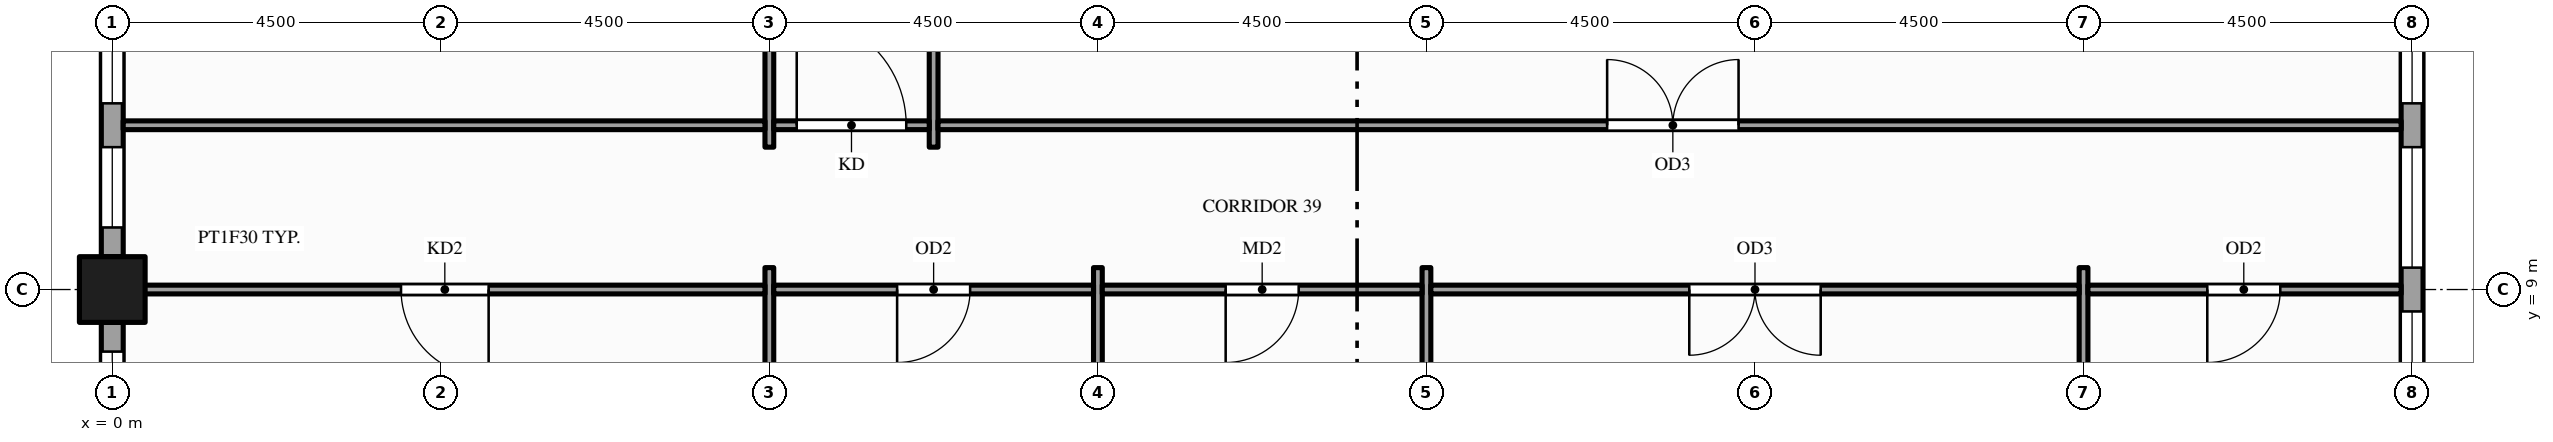
"""IFC4 building model, lengths in metres.
Left out: names, types, materials, properties, quantities, classifications, styles, units other than length and angle.
Written with IfcOpenShell. Run it as: python <this file> out.ifc"""

import sys

from ifc_helpers import new_model, si_unit, direction, frame, frame_2d, origin, origin_2d, place, context, subcontext, project, spatial, rectangle, hollow_rectangle, extrude, element, fill, save


model = new_model("IFC4")
c1 = context("Model", 3, precision=1e-05, world=origin(), true_north=direction((0.0, 1.0)))
c2 = subcontext(c1, "Body", "Model", "MODEL_VIEW")
j1 = project(units=[si_unit("LENGTHUNIT", "METRE"), si_unit("PLANEANGLEUNIT", "RADIAN")], contexts=[c1])
p1 = place(None, origin())
s1 = spatial("IfcSite", under=j1, at=p1, CompositionType="ELEMENT")
p2 = place(p1, origin())
s2 = spatial("IfcBuilding", under=s1, at=p2, CompositionType="ELEMENT")
p3 = place(p2, frame((0.0, 0.0, 143.0)))
s3 = spatial("IfcBuildingStorey", under=s2, at=p3, CompositionType="ELEMENT", Elevation=143.0)
p4 = place(p3, frame((0.0, 9.0, -0.15), z_axis=(0.0, 0.0, 1.0), x_axis=(1.0, 0.0, 0.0)))
e1 = element("IfcColumn", 1, at=p4, inside=s3, PredefinedType="COLUMN", context=c2, shape_type="SweptSolid", body=[
    extrude(hollow_rectangle(XDim=0.9, YDim=0.9, WallThickness=0.045, at=origin_2d()), origin(), (0.0, 0.0, 1.0), 4.0),
])
p5 = place(p3, frame((0.0, 13.05, 0.0), z_axis=(0.0, 0.0, 1.0), x_axis=(0.0, -1.0, 0.0)))
e2 = element("IfcWall", 2, at=p5, inside=s3, PredefinedType="STANDARD", context=c2, shape_type="SweptSolid", body=[
    extrude(rectangle(XDim=3.6, YDim=0.3, at=frame_2d((1.8, 0.0))), origin(), (0.0, 0.0, 1.0), 3.149),
])
p6 = place(p5, frame((0.4, 0.0, 0.9)))
e3 = element("IfcOpeningElement", 3, at=p6, cuts=e2, PredefinedType="OPENING", context=c2, shape_type="SweptSolid", body=[
    extrude(rectangle(XDim=1.1, YDim=2.0, at=frame_2d((0.55, 1.0))), frame((0.0, 0.16, 0.0), z_axis=(0.0, -1.0, 0.0), x_axis=(1.0, 0.0, 0.0)), (0.0, 0.0, 1.0), 0.32),
])
p7 = place(p5, frame((2.1, 0.0, 0.9)))
e4 = element("IfcOpeningElement", 4, at=p7, cuts=e2, PredefinedType="OPENING", context=c2, shape_type="SweptSolid", body=[
    extrude(rectangle(XDim=1.1, YDim=2.0, at=frame_2d((0.55, 1.0))), frame((0.0, 0.16, 0.0), z_axis=(0.0, -1.0, 0.0), x_axis=(1.0, 0.0, 0.0)), (0.0, 0.0, 1.0), 0.32),
])
p8 = place(p3, frame((0.0, 8.55, 0.0), z_axis=(0.0, 0.0, 1.0), x_axis=(0.0, -1.0, 0.0)))
e5 = element("IfcWall", 5, at=p8, inside=s3, PredefinedType="STANDARD", context=c2, shape_type="SweptSolid", body=[
    extrude(rectangle(XDim=3.6, YDim=0.3, at=frame_2d((1.8, 0.0))), origin(), (0.0, 0.0, 1.0), 3.149),
])
p9 = place(p8, frame((0.4, 0.0, 0.9)))
e6 = element("IfcOpeningElement", 6, at=p9, cuts=e5, PredefinedType="OPENING", context=c2, shape_type="SweptSolid", body=[
    extrude(rectangle(XDim=1.1, YDim=2.0, at=frame_2d((0.55, 1.0))), frame((0.0, 0.16, 0.0), z_axis=(0.0, -1.0, 0.0), x_axis=(1.0, 0.0, 0.0)), (0.0, 0.0, 1.0), 0.32),
])
p10 = place(p8, frame((2.1, 0.0, 0.9)))
e7 = element("IfcOpeningElement", 7, at=p10, cuts=e5, PredefinedType="OPENING", context=c2, shape_type="SweptSolid", body=[
    extrude(rectangle(XDim=1.1, YDim=2.0, at=frame_2d((0.55, 1.0))), frame((0.0, 0.16, 0.0), z_axis=(0.0, -1.0, 0.0), x_axis=(1.0, 0.0, 0.0)), (0.0, 0.0, 1.0), 0.32),
])
p11 = place(p3, frame((31.5, 1.95, 0.0), z_axis=(0.0, 0.0, 1.0), x_axis=(0.0, 1.0, 0.0)))
e8 = element("IfcWall", 8, at=p11, inside=s3, PredefinedType="STANDARD", context=c2, shape_type="SweptSolid", body=[
    extrude(rectangle(XDim=21.6, YDim=0.3, at=frame_2d((10.8, 0.0))), origin(), (0.0, 0.0, 1.0), 3.149),
])
p12 = place(p11, frame((0.6, 0.0, 0.9)))
e9 = element("IfcOpeningElement", 9, at=p12, cuts=e8, PredefinedType="OPENING", context=c2, shape_type="SweptSolid", body=[
    extrude(rectangle(XDim=1.65, YDim=2.0, at=frame_2d((0.825, 1.0))), frame((0.0, 0.16, 0.0), z_axis=(0.0, -1.0, 0.0), x_axis=(1.0, 0.0, 0.0)), (0.0, 0.0, 1.0), 0.32),
])
p13 = place(p11, frame((2.85, 0.0, 0.9)))
e10 = element("IfcOpeningElement", 10, at=p13, cuts=e8, PredefinedType="OPENING", context=c2, shape_type="SweptSolid", body=[
    extrude(rectangle(XDim=1.65, YDim=2.0, at=frame_2d((0.825, 1.0))), frame((0.0, 0.16, 0.0), z_axis=(0.0, -1.0, 0.0), x_axis=(1.0, 0.0, 0.0)), (0.0, 0.0, 1.0), 0.32),
])
p14 = place(p11, frame((5.1, 0.0, 0.9)))
e11 = element("IfcOpeningElement", 11, at=p14, cuts=e8, PredefinedType="OPENING", context=c2, shape_type="SweptSolid", body=[
    extrude(rectangle(XDim=1.65, YDim=2.0, at=frame_2d((0.825, 1.0))), frame((0.0, 0.16, 0.0), z_axis=(0.0, -1.0, 0.0), x_axis=(1.0, 0.0, 0.0)), (0.0, 0.0, 1.0), 0.32),
])
p15 = place(p11, frame((7.35, 0.0, 0.9)))
e12 = element("IfcOpeningElement", 12, at=p15, cuts=e8, PredefinedType="OPENING", context=c2, shape_type="SweptSolid", body=[
    extrude(rectangle(XDim=1.65, YDim=2.0, at=frame_2d((0.825, 1.0))), frame((0.0, 0.16, 0.0), z_axis=(0.0, -1.0, 0.0), x_axis=(1.0, 0.0, 0.0)), (0.0, 0.0, 1.0), 0.32),
])
p16 = place(p11, frame((9.6, 0.0, 0.9)))
e13 = element("IfcOpeningElement", 13, at=p16, cuts=e8, PredefinedType="OPENING", context=c2, shape_type="SweptSolid", body=[
    extrude(rectangle(XDim=1.65, YDim=2.0, at=frame_2d((0.825, 1.0))), frame((0.0, 0.16, 0.0), z_axis=(0.0, -1.0, 0.0), x_axis=(1.0, 0.0, 0.0)), (0.0, 0.0, 1.0), 0.32),
])
p17 = place(p11, frame((11.85, 0.0, 0.9)))
e14 = element("IfcOpeningElement", 14, at=p17, cuts=e8, PredefinedType="OPENING", context=c2, shape_type="SweptSolid", body=[
    extrude(rectangle(XDim=1.65, YDim=2.0, at=frame_2d((0.825, 1.0))), frame((0.0, 0.16, 0.0), z_axis=(0.0, -1.0, 0.0), x_axis=(1.0, 0.0, 0.0)), (0.0, 0.0, 1.0), 0.32),
])
p18 = place(p11, frame((14.1, 0.0, 0.9)))
e15 = element("IfcOpeningElement", 15, at=p18, cuts=e8, PredefinedType="OPENING", context=c2, shape_type="SweptSolid", body=[
    extrude(rectangle(XDim=1.65, YDim=2.0, at=frame_2d((0.825, 1.0))), frame((0.0, 0.16, 0.0), z_axis=(0.0, -1.0, 0.0), x_axis=(1.0, 0.0, 0.0)), (0.0, 0.0, 1.0), 0.32),
])
p19 = place(p11, frame((16.35, 0.0, 0.9)))
e16 = element("IfcOpeningElement", 16, at=p19, cuts=e8, PredefinedType="OPENING", context=c2, shape_type="SweptSolid", body=[
    extrude(rectangle(XDim=1.65, YDim=2.0, at=frame_2d((0.825, 1.0))), frame((0.0, 0.16, 0.0), z_axis=(0.0, -1.0, 0.0), x_axis=(1.0, 0.0, 0.0)), (0.0, 0.0, 1.0), 0.32),
])
p20 = place(p11, frame((18.6, 0.0, 0.9)))
e17 = element("IfcOpeningElement", 17, at=p20, cuts=e8, PredefinedType="OPENING", context=c2, shape_type="SweptSolid", body=[
    extrude(rectangle(XDim=1.65, YDim=2.0, at=frame_2d((0.825, 1.0))), frame((0.0, 0.16, 0.0), z_axis=(0.0, -1.0, 0.0), x_axis=(1.0, 0.0, 0.0)), (0.0, 0.0, 1.0), 0.32),
])
p21 = place(p3, frame((9.0, 3.875, 0.0), z_axis=(0.0, 0.0, 1.0), x_axis=(0.0, 1.0, 0.0)))
e18 = element("IfcWall", 18, at=p21, inside=s3, PredefinedType="PARTITIONING", context=c2, shape_type="SweptSolid", body=[
    extrude(rectangle(XDim=5.425, YDim=0.12, at=frame_2d((2.712, 0.0))), origin(), (0.0, 0.0, 1.0), 2.87),
])
p22 = place(p3, frame((9.0, 10.95, 0.0), z_axis=(0.0, 0.0, 1.0), x_axis=(0.0, 1.0, 0.0)))
e19 = element("IfcWall", 19, at=p22, inside=s3, PredefinedType="PARTITIONING", context=c2, shape_type="SweptSolid", body=[
    extrude(rectangle(XDim=20.85, YDim=0.12, at=frame_2d((10.425, 0.0))), origin(), (0.0, 0.0, 1.0), 2.6),
])
p23 = place(p22, frame((2.05, 0.0, 0.0)))
e20 = element("IfcOpeningElement", 20, at=p23, cuts=e19, PredefinedType="OPENING", context=c2, shape_type="SweptSolid", body=[
    extrude(rectangle(XDim=1.0, YDim=2.1, at=frame_2d((0.5, 1.05))), frame((0.0, 0.07, 0.0), z_axis=(0.0, -1.0, 0.0), x_axis=(1.0, 0.0, 0.0)), (0.0, 0.0, 1.0), 0.14),
])
p24 = place(p22, frame((6.55, 0.0, 0.0)))
e21 = element("IfcOpeningElement", 21, at=p24, cuts=e19, PredefinedType="OPENING", context=c2, shape_type="SweptSolid", body=[
    extrude(rectangle(XDim=1.0, YDim=2.1, at=frame_2d((0.5, 1.05))), frame((0.0, 0.07, 0.0), z_axis=(0.0, -1.0, 0.0), x_axis=(1.0, 0.0, 0.0)), (0.0, 0.0, 1.0), 0.14),
])
p25 = place(p22, frame((11.805, 0.0, 0.0)))
e22 = element("IfcOpeningElement", 22, at=p25, cuts=e19, PredefinedType="OPENING", context=c2, shape_type="SweptSolid", body=[
    extrude(rectangle(XDim=1.8, YDim=2.1, at=frame_2d((0.9, 1.05))), frame((0.0, 0.07, 0.0), z_axis=(0.0, -1.0, 0.0), x_axis=(1.0, 0.0, 0.0)), (0.0, 0.0, 1.0), 0.14),
])
p26 = place(p3, frame((11.25, 10.95, 0.0), z_axis=(0.0, 0.0, 1.0), x_axis=(0.0, 1.0, 0.0)))
e23 = element("IfcWall", 23, at=p26, inside=s3, PredefinedType="PARTITIONING", context=c2, shape_type="SweptSolid", body=[
    extrude(rectangle(XDim=20.85, YDim=0.12, at=frame_2d((10.425, 0.0))), origin(), (0.0, 0.0, 1.0), 2.6),
])
p27 = place(p26, frame((17.8, 0.0, 0.0)))
e24 = element("IfcOpeningElement", 24, at=p27, cuts=e23, PredefinedType="OPENING", context=c2, shape_type="SweptSolid", body=[
    extrude(rectangle(XDim=1.0, YDim=2.1, at=frame_2d((0.5, 1.05))), frame((0.0, 0.07, 0.0), z_axis=(0.0, -1.0, 0.0), x_axis=(1.0, 0.0, 0.0)), (0.0, 0.0, 1.0), 0.14),
])
p28 = place(p26, frame((4.2, 0.0, 0.0)))
e25 = element("IfcOpeningElement", 25, at=p28, cuts=e23, PredefinedType="OPENING", context=c2, shape_type="SweptSolid", body=[
    extrude(rectangle(XDim=1.2, YDim=2.1, at=frame_2d((0.6, 1.05))), frame((0.0, 0.07, 0.0), z_axis=(0.0, -1.0, 0.0), x_axis=(1.0, 0.0, 0.0)), (0.0, 0.0, 1.0), 0.14),
])
for number, where, z_axis, x_axis in (
    (26, (13.5, 0.15, 0.0), (0.0, 0.0, 1.0), (0.0, 1.0, 0.0)),
    (27, (18.0, 0.15, 0.0), (0.0, 0.0, 1.0), (0.0, 1.0, 0.0)),
):
    element("IfcWall", number, at=place(p3, frame(where, z_axis=z_axis, x_axis=x_axis)), inside=s3, PredefinedType="PARTITIONING", context=c2, shape_type="SweptSolid", body=[
        extrude(rectangle(XDim=9.15, YDim=0.12, at=frame_2d((4.575, 0.0))), origin(), (0.0, 0.0, 1.0), 2.87),
    ])
p29 = place(p3, frame((27.0, 1.65, 0.0), z_axis=(0.0, 0.0, 1.0), x_axis=(0.0, 1.0, 0.0)))
e28 = element("IfcWall", 28, at=p29, inside=s3, PredefinedType="PARTITIONING", context=c2, shape_type="SweptSolid", body=[
    extrude(rectangle(XDim=7.65, YDim=0.12, at=frame_2d((3.825, 0.0))), origin(), (0.0, 0.0, 1.0), 2.87),
])
p30 = place(p3, frame((0.15, 9.0, 0.0), z_axis=(0.0, 0.0, 1.0), x_axis=(1.0, 0.0, 0.0)))
e29 = element("IfcWall", 29, at=p30, inside=s3, PredefinedType="PARTITIONING", context=c2, shape_type="SweptSolid", body=[
    extrude(rectangle(XDim=8.79, YDim=0.12, at=frame_2d((4.395, 0.0))), origin(), (0.0, 0.0, 1.0), 2.87),
])
p31 = place(p30, frame((3.805, 0.0, 0.0)))
e30 = element("IfcOpeningElement", 30, at=p31, cuts=e29, PredefinedType="OPENING", context=c2, shape_type="SweptSolid", body=[
    extrude(rectangle(XDim=1.2, YDim=2.1, at=frame_2d((0.6, 1.05))), frame((0.0, 0.07, 0.0), z_axis=(0.0, -1.0, 0.0), x_axis=(1.0, 0.0, 0.0)), (0.0, 0.0, 1.0), 0.14),
])
p32 = place(p3, frame((9.06, 9.0, 0.0), z_axis=(0.0, 0.0, 1.0), x_axis=(1.0, 0.0, 0.0)))
e31 = element("IfcWall", 31, at=p32, inside=s3, PredefinedType="PARTITIONING", context=c2, shape_type="SweptSolid", body=[
    extrude(rectangle(XDim=4.38, YDim=0.12, at=frame_2d((2.19, 0.0))), origin(), (0.0, 0.0, 1.0), 2.87),
])
p33 = place(p32, frame((1.69, 0.0, 0.0)))
e32 = element("IfcOpeningElement", 32, at=p33, cuts=e31, PredefinedType="OPENING", context=c2, shape_type="SweptSolid", body=[
    extrude(rectangle(XDim=1.0, YDim=2.1, at=frame_2d((0.5, 1.05))), frame((0.0, 0.07, 0.0), z_axis=(0.0, -1.0, 0.0), x_axis=(1.0, 0.0, 0.0)), (0.0, 0.0, 1.0), 0.14),
])
p34 = place(p3, frame((13.56, 9.0, 0.0), z_axis=(0.0, 0.0, 1.0), x_axis=(1.0, 0.0, 0.0)))
e33 = element("IfcWall", 33, at=p34, inside=s3, PredefinedType="PARTITIONING", context=c2, shape_type="SweptSolid", body=[
    extrude(rectangle(XDim=4.38, YDim=0.12, at=frame_2d((2.19, 0.0))), origin(), (0.0, 0.0, 1.0), 2.87),
])
p35 = place(p34, frame((1.69, 0.0, 0.0)))
e34 = element("IfcOpeningElement", 34, at=p35, cuts=e33, PredefinedType="OPENING", context=c2, shape_type="SweptSolid", body=[
    extrude(rectangle(XDim=1.0, YDim=2.1, at=frame_2d((0.5, 1.05))), frame((0.0, 0.07, 0.0), z_axis=(0.0, -1.0, 0.0), x_axis=(1.0, 0.0, 0.0)), (0.0, 0.0, 1.0), 0.14),
])
p36 = place(p3, frame((18.06, 9.0, 0.0), z_axis=(0.0, 0.0, 1.0), x_axis=(1.0, 0.0, 0.0)))
e35 = element("IfcWall", 35, at=p36, inside=s3, PredefinedType="PARTITIONING", context=c2, shape_type="SweptSolid", body=[
    extrude(rectangle(XDim=8.88, YDim=0.12, at=frame_2d((4.44, 0.0))), origin(), (0.0, 0.0, 1.0), 2.87),
])
p37 = place(p36, frame((3.54, 0.0, 0.0)))
e36 = element("IfcOpeningElement", 36, at=p37, cuts=e35, PredefinedType="OPENING", context=c2, shape_type="SweptSolid", body=[
    extrude(rectangle(XDim=1.8, YDim=2.1, at=frame_2d((0.9, 1.05))), frame((0.0, 0.07, 0.0), z_axis=(0.0, -1.0, 0.0), x_axis=(1.0, 0.0, 0.0)), (0.0, 0.0, 1.0), 0.14),
])
p38 = place(p3, frame((27.06, 9.0, 0.0), z_axis=(0.0, 0.0, 1.0), x_axis=(1.0, 0.0, 0.0)))
e37 = element("IfcWall", 37, at=p38, inside=s3, PredefinedType="PARTITIONING", context=c2, shape_type="SweptSolid", body=[
    extrude(rectangle(XDim=4.29, YDim=0.12, at=frame_2d((2.145, 0.0))), origin(), (0.0, 0.0, 1.0), 2.87),
])
p39 = place(p38, frame((1.635, 0.0, 0.0)))
e38 = element("IfcOpeningElement", 38, at=p39, cuts=e37, PredefinedType="OPENING", context=c2, shape_type="SweptSolid", body=[
    extrude(rectangle(XDim=1.0, YDim=2.1, at=frame_2d((0.5, 1.05))), frame((0.0, 0.07, 0.0), z_axis=(0.0, -1.0, 0.0), x_axis=(1.0, 0.0, 0.0)), (0.0, 0.0, 1.0), 0.14),
])
p40 = place(p3, frame((0.15, 11.25, 0.0), z_axis=(0.0, 0.0, 1.0), x_axis=(1.0, 0.0, 0.0)))
e39 = element("IfcWall", 39, at=p40, inside=s3, PredefinedType="PARTITIONING", context=c2, shape_type="SweptSolid", body=[
    extrude(rectangle(XDim=8.79, YDim=0.12, at=frame_2d((4.395, 0.0))), origin(), (0.0, 0.0, 1.0), 2.87),
])
p41 = place(p3, frame((9.06, 11.25, 0.0), z_axis=(0.0, 0.0, 1.0), x_axis=(1.0, 0.0, 0.0)))
e40 = element("IfcWall", 40, at=p41, inside=s3, PredefinedType="PARTITIONING", context=c2, shape_type="SweptSolid", body=[
    extrude(rectangle(XDim=2.13, YDim=0.12, at=frame_2d((1.065, 0.0))), origin(), (0.0, 0.0, 1.0), 2.87),
])
p42 = place(p41, frame((0.315, 0.0, 0.0)))
e41 = element("IfcOpeningElement", 41, at=p42, cuts=e40, PredefinedType="OPENING", context=c2, shape_type="SweptSolid", body=[
    extrude(rectangle(XDim=1.5, YDim=2.1, at=frame_2d((0.75, 1.05))), frame((0.0, 0.07, 0.0), z_axis=(0.0, -1.0, 0.0), x_axis=(1.0, 0.0, 0.0)), (0.0, 0.0, 1.0), 0.14),
])
p43 = place(p3, frame((11.31, 11.25, 0.0), z_axis=(0.0, 0.0, 1.0), x_axis=(1.0, 0.0, 0.0)))
e42 = element("IfcWall", 42, at=p43, inside=s3, PredefinedType="PARTITIONING", context=c2, shape_type="SweptSolid", body=[
    extrude(rectangle(XDim=20.04, YDim=0.12, at=frame_2d((10.02, 0.0))), origin(), (0.0, 0.0, 1.0), 2.87),
])
p44 = place(p43, frame((9.165, 0.0, 0.0)))
e43 = element("IfcOpeningElement", 43, at=p44, cuts=e42, PredefinedType="OPENING", context=c2, shape_type="SweptSolid", body=[
    extrude(rectangle(XDim=1.8, YDim=2.1, at=frame_2d((0.9, 1.05))), frame((0.0, 0.07, 0.0), z_axis=(0.0, -1.0, 0.0), x_axis=(1.0, 0.0, 0.0)), (0.0, 0.0, 1.0), 0.14),
])
p45 = place(p6, origin())
e44 = element("IfcWindow", 44, at=p45, inside=s3, PartitioningType="SINGLE_PANEL", PredefinedType="WINDOW", context=c2, shape_type="SweptSolid", body=[
    extrude(rectangle(XDim=1.1, YDim=2.0, at=frame_2d((0.55, 1.0))), frame((0.0, 0.03, 0.0), z_axis=(0.0, -1.0, 0.0), x_axis=(1.0, 0.0, 0.0)), (0.0, 0.0, 1.0), 0.06),
])
fill(e3, e44)
p46 = place(p7, origin())
e45 = element("IfcWindow", 45, at=p46, inside=s3, PartitioningType="SINGLE_PANEL", PredefinedType="WINDOW", context=c2, shape_type="SweptSolid", body=[
    extrude(rectangle(XDim=1.1, YDim=2.0, at=frame_2d((0.55, 1.0))), frame((0.0, 0.03, 0.0), z_axis=(0.0, -1.0, 0.0), x_axis=(1.0, 0.0, 0.0)), (0.0, 0.0, 1.0), 0.06),
])
fill(e4, e45)
p47 = place(p9, origin())
e46 = element("IfcWindow", 46, at=p47, inside=s3, PartitioningType="SINGLE_PANEL", PredefinedType="WINDOW", context=c2, shape_type="SweptSolid", body=[
    extrude(rectangle(XDim=1.1, YDim=2.0, at=frame_2d((0.55, 1.0))), frame((0.0, 0.03, 0.0), z_axis=(0.0, -1.0, 0.0), x_axis=(1.0, 0.0, 0.0)), (0.0, 0.0, 1.0), 0.06),
])
fill(e6, e46)
p48 = place(p14, origin())
e47 = element("IfcWindow", 47, at=p48, inside=s3, PartitioningType="SINGLE_PANEL", PredefinedType="WINDOW", context=c2, shape_type="SweptSolid", body=[
    extrude(rectangle(XDim=1.65, YDim=2.0, at=frame_2d((0.825, 1.0))), frame((0.0, 0.03, 0.0), z_axis=(0.0, -1.0, 0.0), x_axis=(1.0, 0.0, 0.0)), (0.0, 0.0, 1.0), 0.06),
])
fill(e11, e47)
p49 = place(p15, origin())
e48 = element("IfcWindow", 48, at=p49, inside=s3, PartitioningType="SINGLE_PANEL", PredefinedType="WINDOW", context=c2, shape_type="SweptSolid", body=[
    extrude(rectangle(XDim=1.65, YDim=2.0, at=frame_2d((0.825, 1.0))), frame((0.0, 0.03, 0.0), z_axis=(0.0, -1.0, 0.0), x_axis=(1.0, 0.0, 0.0)), (0.0, 0.0, 1.0), 0.06),
])
fill(e12, e48)
p50 = place(p16, origin())
e49 = element("IfcWindow", 49, at=p50, inside=s3, PartitioningType="SINGLE_PANEL", PredefinedType="WINDOW", context=c2, shape_type="SweptSolid", body=[
    extrude(rectangle(XDim=1.65, YDim=2.0, at=frame_2d((0.825, 1.0))), frame((0.0, 0.03, 0.0), z_axis=(0.0, -1.0, 0.0), x_axis=(1.0, 0.0, 0.0)), (0.0, 0.0, 1.0), 0.06),
])
fill(e13, e49)
p51 = place(p31, origin())
e50 = element("IfcDoor", 50, at=p51, inside=s3, OperationType="SINGLE_SWING_RIGHT", PredefinedType="DOOR", context=c2, shape_type="SweptSolid", body=[
    extrude(rectangle(XDim=1.2, YDim=2.1, at=frame_2d((0.6, 1.05))), frame((0.0, 0.025, 0.0), z_axis=(0.0, -1.0, 0.0), x_axis=(1.0, 0.0, 0.0)), (0.0, 0.0, 1.0), 0.05),
])
fill(e30, e50)
p52 = place(p33, origin())
e51 = element("IfcDoor", 51, at=p52, inside=s3, OperationType="SINGLE_SWING_LEFT", PredefinedType="DOOR", context=c2, shape_type="SweptSolid", body=[
    extrude(rectangle(XDim=1.0, YDim=2.1, at=frame_2d((0.5, 1.05))), frame((0.0, 0.025, 0.0), z_axis=(0.0, -1.0, 0.0), x_axis=(1.0, 0.0, 0.0)), (0.0, 0.0, 1.0), 0.05),
])
fill(e32, e51)
p53 = place(p35, origin())
e52 = element("IfcDoor", 52, at=p53, inside=s3, OperationType="SINGLE_SWING_LEFT", PredefinedType="DOOR", context=c2, shape_type="SweptSolid", body=[
    extrude(rectangle(XDim=1.0, YDim=2.1, at=frame_2d((0.5, 1.05))), frame((0.0, 0.025, 0.0), z_axis=(0.0, -1.0, 0.0), x_axis=(1.0, 0.0, 0.0)), (0.0, 0.0, 1.0), 0.05),
])
fill(e34, e52)
p54 = place(p37, origin())
e53 = element("IfcDoor", 53, at=p54, inside=s3, OperationType="DOUBLE_DOOR_SINGLE_SWING", PredefinedType="DOOR", context=c2, shape_type="SweptSolid", body=[
    extrude(rectangle(XDim=1.8, YDim=2.1, at=frame_2d((0.9, 1.05))), frame((0.0, 0.025, 0.0), z_axis=(0.0, -1.0, 0.0), x_axis=(1.0, 0.0, 0.0)), (0.0, 0.0, 1.0), 0.05),
])
fill(e36, e53)
p55 = place(p39, origin())
e54 = element("IfcDoor", 54, at=p55, inside=s3, OperationType="SINGLE_SWING_LEFT", PredefinedType="DOOR", context=c2, shape_type="SweptSolid", body=[
    extrude(rectangle(XDim=1.0, YDim=2.1, at=frame_2d((0.5, 1.05))), frame((0.0, 0.025, 0.0), z_axis=(0.0, -1.0, 0.0), x_axis=(1.0, 0.0, 0.0)), (0.0, 0.0, 1.0), 0.05),
])
fill(e38, e54)
p56 = place(p44, origin())
e55 = element("IfcDoor", 55, at=p56, inside=s3, OperationType="DOUBLE_DOOR_SINGLE_SWING", PredefinedType="DOOR", context=c2, shape_type="SweptSolid", body=[
    extrude(rectangle(XDim=1.8, YDim=2.1, at=frame_2d((0.9, 1.05))), frame((0.0, 0.025, 0.0), z_axis=(0.0, -1.0, 0.0), x_axis=(1.0, 0.0, 0.0)), (0.0, 0.0, 1.0), 0.05),
])
fill(e43, e55)
p57 = place(p42, origin())
e56 = element("IfcDoor", 56, at=p57, inside=s3, OperationType="SINGLE_SWING_LEFT", PredefinedType="DOOR", context=c2, shape_type="SweptSolid", body=[
    extrude(rectangle(XDim=1.5, YDim=2.1, at=frame_2d((0.75, 1.05))), frame((0.0, 0.025, 0.0), z_axis=(0.0, -1.0, 0.0), x_axis=(1.0, 0.0, 0.0)), (0.0, 0.0, 1.0), 0.05),
])
fill(e41, e56)
save(model, sys.argv[1])
